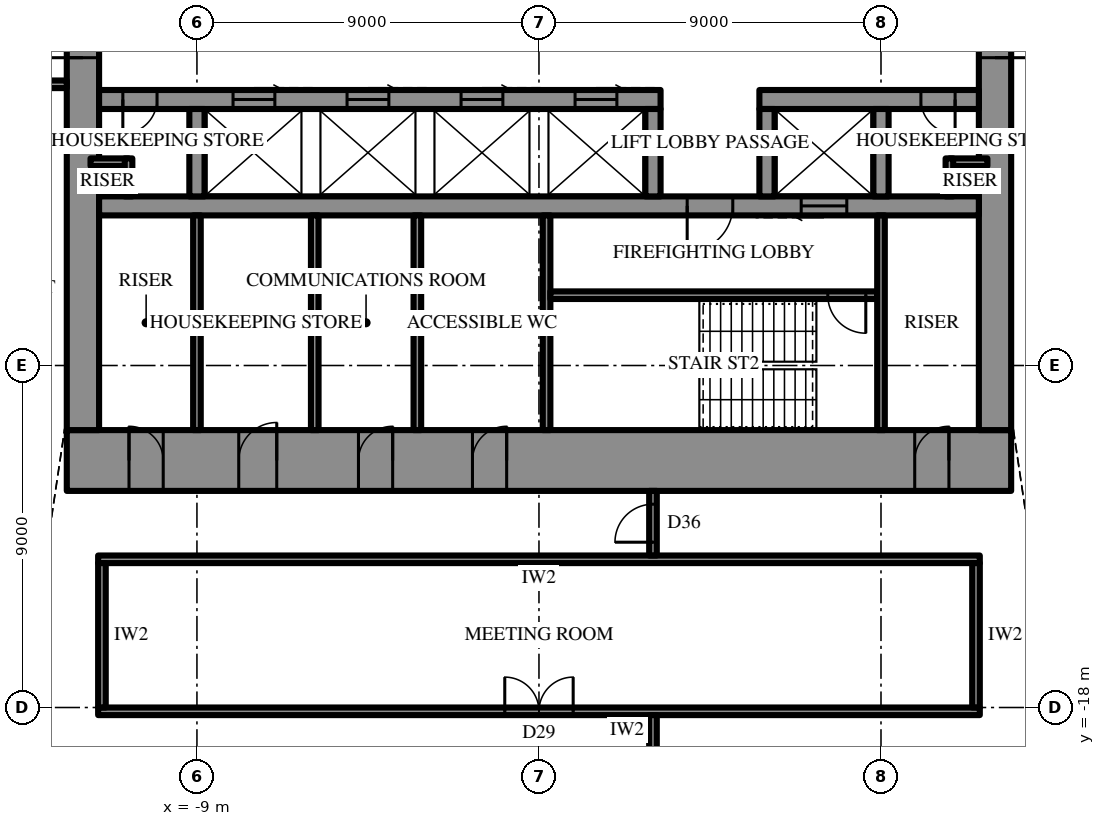
"""IFC4 building model, lengths in metres.
Left out: names, types, materials, properties, quantities, classifications, styles, units other than length and angle.
Written with IfcOpenShell. Run it as: python <this file> out.ifc"""

import sys

from ifc_helpers import new_model, si_unit, direction, frame, frame_2d, origin, place, context, subcontext, project, spatial, rectangle, extrude, element, fill, save


model = new_model("IFC4")
c1 = context("Model", 3, precision=1e-05, world=origin(), true_north=direction((0.0, 1.0)))
c2 = subcontext(c1, "Body", "Model", "MODEL_VIEW")
j1 = project(units=[si_unit("LENGTHUNIT", "METRE"), si_unit("PLANEANGLEUNIT", "RADIAN")], contexts=[c1])
p1 = place(None, origin())
s1 = spatial("IfcSite", under=j1, at=p1, CompositionType="ELEMENT")
p2 = place(p1, origin())
s2 = spatial("IfcBuilding", under=s1, at=p2, CompositionType="ELEMENT")
p3 = place(p2, frame((0.0, 0.0, 361.9)))
s3 = spatial("IfcBuildingStorey", under=s2, at=p3, CompositionType="ELEMENT", Elevation=361.9)
p4 = place(p3, frame((12.425, -11.5, 0.0), z_axis=(0.0, 0.0, 1.0), x_axis=(-1.0, 0.0, 0.0)))
e1 = element("IfcWall", 1, at=p4, inside=s3, PredefinedType="SHEAR", context=c2, shape_type="SweptSolid", body=[
    extrude(rectangle(XDim=24.85, YDim=1.6, at=frame_2d((12.425, 0.0))), origin(), (0.0, 0.0, 1.0), 4.2),
])
p5 = place(p4, frame((13.275, 0.0, 0.0)))
e2 = element("IfcOpeningElement", 2, at=p5, cuts=e1, PredefinedType="OPENING", context=c2, shape_type="SweptSolid", body=[
    extrude(rectangle(XDim=0.9, YDim=2.2, at=frame_2d((0.45, 1.1))), frame((0.0, 0.81, 0.0), z_axis=(0.0, -1.0, 0.0), x_axis=(1.0, 0.0, 0.0)), (0.0, 0.0, 1.0), 1.62),
])
p6 = place(p4, frame((16.275, 0.0, 0.0)))
e3 = element("IfcOpeningElement", 3, at=p6, cuts=e1, PredefinedType="OPENING", context=c2, shape_type="SweptSolid", body=[
    extrude(rectangle(XDim=0.9, YDim=2.2, at=frame_2d((0.45, 1.1))), frame((0.0, 0.81, 0.0), z_axis=(0.0, -1.0, 0.0), x_axis=(1.0, 0.0, 0.0)), (0.0, 0.0, 1.0), 1.62),
])
p7 = place(p4, frame((19.325, 0.0, 0.0)))
e4 = element("IfcOpeningElement", 4, at=p7, cuts=e1, PredefinedType="OPENING", context=c2, shape_type="SweptSolid", body=[
    extrude(rectangle(XDim=1.0, YDim=2.2, at=frame_2d((0.5, 1.1))), frame((0.0, 0.81, 0.0), z_axis=(0.0, -1.0, 0.0), x_axis=(1.0, 0.0, 0.0)), (0.0, 0.0, 1.0), 1.62),
])
p8 = place(p4, frame((1.637, 0.0, 0.0)))
e5 = element("IfcOpeningElement", 5, at=p8, cuts=e1, PredefinedType="OPENING", context=c2, shape_type="SweptSolid", body=[
    extrude(rectangle(XDim=0.9, YDim=2.2, at=frame_2d((0.45, 1.1))), frame((0.0, 0.81, 0.0), z_axis=(0.0, -1.0, 0.0), x_axis=(1.0, 0.0, 0.0)), (0.0, 0.0, 1.0), 1.62),
])
p9 = place(p4, frame((22.312, 0.0, 0.0)))
e6 = element("IfcOpeningElement", 6, at=p9, cuts=e1, PredefinedType="OPENING", context=c2, shape_type="SweptSolid", body=[
    extrude(rectangle(XDim=0.9, YDim=2.2, at=frame_2d((0.45, 1.1))), frame((0.0, 0.81, 0.0), z_axis=(0.0, -1.0, 0.0), x_axis=(1.0, 0.0, 0.0)), (0.0, 0.0, 1.0), 1.62),
])
p10 = place(p3, frame((12.0, -10.7, 0.0), z_axis=(0.0, 0.0, 1.0), x_axis=(0.0, 1.0, 0.0)))
e7 = element("IfcWall", 7, at=p10, inside=s3, PredefinedType="SHEAR", context=c2, shape_type="SweptSolid", body=[
    extrude(rectangle(XDim=21.4, YDim=0.85, at=frame_2d((10.7, 0.0))), origin(), (0.0, 0.0, 1.0), 4.2),
])
p11 = place(p10, frame((9.8, 0.0, 0.0)))
e8 = element("IfcOpeningElement", 8, at=p11, cuts=e7, PredefinedType="OPENING", context=c2, shape_type="SweptSolid", body=[
    extrude(rectangle(XDim=1.8, YDim=2.4, at=frame_2d((0.9, 1.2))), frame((0.0, 0.435, 0.0), z_axis=(0.0, -1.0, 0.0), x_axis=(1.0, 0.0, 0.0)), (0.0, 0.0, 1.0), 0.87),
])
p12 = place(p3, frame((-12.0, 10.7, 0.0), z_axis=(0.0, 0.0, 1.0), x_axis=(0.0, -1.0, 0.0)))
e9 = element("IfcWall", 9, at=p12, inside=s3, PredefinedType="SHEAR", context=c2, shape_type="SweptSolid", body=[
    extrude(rectangle(XDim=21.4, YDim=0.85, at=frame_2d((10.7, 0.0))), origin(), (0.0, 0.0, 1.0), 4.2),
])
p13 = place(p12, frame((9.8, 0.0, 0.0)))
e10 = element("IfcOpeningElement", 10, at=p13, cuts=e9, PredefinedType="OPENING", context=c2, shape_type="SweptSolid", body=[
    extrude(rectangle(XDim=1.8, YDim=2.4, at=frame_2d((0.9, 1.2))), frame((0.0, 0.435, 0.0), z_axis=(0.0, -1.0, 0.0), x_axis=(1.0, 0.0, 0.0)), (0.0, 0.0, 1.0), 0.87),
])
p14 = place(p3, frame((11.575, -2.0, 0.0), z_axis=(0.0, 0.0, 1.0), x_axis=(-1.0, 0.0, 0.0)))
e11 = element("IfcWall", 11, at=p14, inside=s3, PredefinedType="SHEAR", context=c2, shape_type="SweptSolid", body=[
    extrude(rectangle(XDim=5.775, YDim=0.5, at=frame_2d((2.887, 0.0))), origin(), (0.0, 0.0, 1.0), 4.2),
])
p15 = place(p14, frame((0.625, 0.0, 0.0)))
e12 = element("IfcOpeningElement", 12, at=p15, cuts=e11, PredefinedType="OPENING", context=c2, shape_type="SweptSolid", body=[
    extrude(rectangle(XDim=0.9, YDim=2.2, at=frame_2d((0.45, 1.1))), frame((0.0, 0.26, 0.0), z_axis=(0.0, -1.0, 0.0), x_axis=(1.0, 0.0, 0.0)), (0.0, 0.0, 1.0), 0.52),
])
p16 = place(p3, frame((3.2, -2.0, 0.0), z_axis=(0.0, 0.0, 1.0), x_axis=(-1.0, 0.0, 0.0)))
e13 = element("IfcWall", 13, at=p16, inside=s3, PredefinedType="SHEAR", context=c2, shape_type="SweptSolid", body=[
    extrude(rectangle(XDim=14.775, YDim=0.5, at=frame_2d((7.387, 0.0))), origin(), (0.0, 0.0, 1.0), 4.2),
])
p17 = place(p16, frame((13.25, 0.0, 0.0)))
e14 = element("IfcOpeningElement", 14, at=p17, cuts=e13, PredefinedType="OPENING", context=c2, shape_type="SweptSolid", body=[
    extrude(rectangle(XDim=0.9, YDim=2.2, at=frame_2d((0.45, 1.1))), frame((0.0, 0.26, 0.0), z_axis=(0.0, -1.0, 0.0), x_axis=(1.0, 0.0, 0.0)), (0.0, 0.0, 1.0), 0.52),
])
p18 = place(p16, frame((1.15, 0.0, 0.0)))
e15 = element("IfcOpeningElement", 15, at=p18, cuts=e13, PredefinedType="OPENING", context=c2, shape_type="SweptSolid", body=[
    extrude(rectangle(XDim=1.1, YDim=2.2, at=frame_2d((0.55, 1.1))), frame((0.0, 0.26, 0.0), z_axis=(0.0, -1.0, 0.0), x_axis=(1.0, 0.0, 0.0)), (0.0, 0.0, 1.0), 0.52),
])
p19 = place(p16, frame((4.15, 0.0, 0.0)))
e16 = element("IfcOpeningElement", 16, at=p19, cuts=e13, PredefinedType="OPENING", context=c2, shape_type="SweptSolid", body=[
    extrude(rectangle(XDim=1.1, YDim=2.2, at=frame_2d((0.55, 1.1))), frame((0.0, 0.26, 0.0), z_axis=(0.0, -1.0, 0.0), x_axis=(1.0, 0.0, 0.0)), (0.0, 0.0, 1.0), 0.52),
])
p20 = place(p16, frame((7.15, 0.0, 0.0)))
e17 = element("IfcOpeningElement", 17, at=p20, cuts=e13, PredefinedType="OPENING", context=c2, shape_type="SweptSolid", body=[
    extrude(rectangle(XDim=1.1, YDim=2.2, at=frame_2d((0.55, 1.1))), frame((0.0, 0.26, 0.0), z_axis=(0.0, -1.0, 0.0), x_axis=(1.0, 0.0, 0.0)), (0.0, 0.0, 1.0), 0.52),
])
p21 = place(p16, frame((10.15, 0.0, 0.0)))
e18 = element("IfcOpeningElement", 18, at=p21, cuts=e13, PredefinedType="OPENING", context=c2, shape_type="SweptSolid", body=[
    extrude(rectangle(XDim=1.1, YDim=2.2, at=frame_2d((0.55, 1.1))), frame((0.0, 0.26, 0.0), z_axis=(0.0, -1.0, 0.0), x_axis=(1.0, 0.0, 0.0)), (0.0, 0.0, 1.0), 0.52),
])
p22 = place(p3, frame((11.575, -4.8, 0.0), z_axis=(0.0, 0.0, 1.0), x_axis=(-1.0, 0.0, 0.0)))
e19 = element("IfcWall", 19, at=p22, inside=s3, PredefinedType="SHEAR", context=c2, shape_type="SweptSolid", body=[
    extrude(rectangle(XDim=23.15, YDim=0.5, at=frame_2d((11.575, 0.0))), origin(), (0.0, 0.0, 1.0), 4.2),
])
p23 = place(p22, frame((6.475, 0.0, 0.0)))
e20 = element("IfcOpeningElement", 20, at=p23, cuts=e19, PredefinedType="OPENING", context=c2, shape_type="SweptSolid", body=[
    extrude(rectangle(XDim=1.2, YDim=2.2, at=frame_2d((0.6, 1.1))), frame((0.0, 0.26, 0.0), z_axis=(0.0, -1.0, 0.0), x_axis=(1.0, 0.0, 0.0)), (0.0, 0.0, 1.0), 0.52),
])
p24 = place(p22, frame((3.475, 0.0, 0.0)))
e21 = element("IfcOpeningElement", 21, at=p24, cuts=e19, PredefinedType="OPENING", context=c2, shape_type="SweptSolid", body=[
    extrude(rectangle(XDim=1.2, YDim=2.2, at=frame_2d((0.6, 1.1))), frame((0.0, 0.26, 0.0), z_axis=(0.0, -1.0, 0.0), x_axis=(1.0, 0.0, 0.0)), (0.0, 0.0, 1.0), 0.52),
])
for number, where, z_axis, x_axis in (
    (22, (9.0, -2.25, 0.0), (0.0, 0.0, 1.0), (0.0, -1.0, 0.0)),
    (23, (6.0, -2.25, 0.0), (0.0, 0.0, 1.0), (0.0, -1.0, 0.0)),
    (24, (3.0, -2.25, 0.0), (0.0, 0.0, 1.0), (0.0, -1.0, 0.0)),
    (25, (-9.0, -2.25, 0.0), (0.0, 0.0, 1.0), (0.0, -1.0, 0.0)),
):
    element("IfcWall", number, at=place(p3, frame(where, z_axis=z_axis, x_axis=x_axis)), inside=s3, PredefinedType="SHEAR", context=c2, shape_type="SweptSolid", body=[
        extrude(rectangle(XDim=2.3, YDim=0.4, at=frame_2d((1.15, 0.0))), origin(), (0.0, 0.0, 1.0), 4.2),
    ])
p25 = place(p3, frame((0.2, -5.05, 0.0), z_axis=(0.0, 0.0, 1.0), x_axis=(0.0, -1.0, 0.0)))
e26 = element("IfcWall", 26, at=p25, inside=s3, PredefinedType="SHEAR", context=c2, shape_type="SweptSolid", body=[
    extrude(rectangle(XDim=5.65, YDim=0.2, at=frame_2d((2.825, 0.0))), origin(), (0.0, 0.0, 1.0), 4.2),
])
p26 = place(p3, frame((8.9, -7.15, 0.0), z_axis=(0.0, 0.0, 1.0), x_axis=(-1.0, 0.0, 0.0)))
e27 = element("IfcWall", 27, at=p26, inside=s3, PredefinedType="SHEAR", context=c2, shape_type="SweptSolid", body=[
    extrude(rectangle(XDim=8.6, YDim=0.2, at=frame_2d((4.3, 0.0))), origin(), (0.0, 0.0, 1.0), 4.2),
])
p27 = place(p26, frame((0.3, 0.0, 0.0)))
e28 = element("IfcOpeningElement", 28, at=p27, cuts=e27, PredefinedType="OPENING", context=c2, shape_type="SweptSolid", body=[
    extrude(rectangle(XDim=1.0, YDim=2.2, at=frame_2d((0.5, 1.1))), frame((0.0, 0.11, 0.0), z_axis=(0.0, -1.0, 0.0), x_axis=(1.0, 0.0, 0.0)), (0.0, 0.0, 1.0), 0.22),
])
for number, where, z_axis, x_axis in (
    (29, (9.0, -5.05, 0.0), (0.0, 0.0, 1.0), (0.0, -1.0, 0.0)),
    (30, (-9.0, -5.05, 0.0), (0.0, 0.0, 1.0), (0.0, -1.0, 0.0)),
    (31, (-3.2, -5.05, 0.0), (0.0, 0.0, 1.0), (0.0, -1.0, 0.0)),
    (32, (-5.9, -5.05, 0.0), (0.0, 0.0, 1.0), (0.0, -1.0, 0.0)),
):
    element("IfcWall", number, at=place(p3, frame(where, z_axis=z_axis, x_axis=x_axis)), inside=s3, PredefinedType="PARTITIONING", context=c2, shape_type="SweptSolid", body=[
        extrude(rectangle(XDim=5.65, YDim=0.2, at=frame_2d((2.825, 0.0))), origin(), (0.0, 0.0, 1.0), 4.0),
    ])
for number, where, z_axis, x_axis in (
    (33, (11.8, -3.65, 0.0), (0.0, 0.0, 1.0), (-1.0, 0.0, 0.0)),
    (34, (10.8, -3.55, 0.0), (0.0, 0.0, 1.0), (0.0, -1.0, 0.0)),
    (35, (-10.8, -3.65, 0.0), (0.0, 0.0, 1.0), (-1.0, 0.0, 0.0)),
    (36, (-10.8, -3.55, 0.0), (0.0, 0.0, 1.0), (0.0, -1.0, 0.0)),
):
    element("IfcWall", number, at=place(p3, frame(where, z_axis=z_axis, x_axis=x_axis)), inside=s3, PredefinedType="PARTITIONING", context=c2, shape_type="SweptSolid", body=[
        extrude(rectangle(XDim=1.0, YDim=0.2, at=frame_2d((0.5, 0.0))), origin(), (0.0, 0.0, 1.0), 4.0),
    ])
p28 = place(p3, frame((11.6, -14.1, 0.0), z_axis=(0.0, 0.0, 1.0), x_axis=(-1.0, 0.0, 0.0)))
e37 = element("IfcWall", 37, at=p28, inside=s3, PredefinedType="PARTITIONING", context=c2, shape_type="SweptSolid", body=[
    extrude(rectangle(XDim=23.2, YDim=0.2, at=frame_2d((11.6, 0.0))), origin(), (0.0, 0.0, 1.0), 4.0),
])
p29 = place(p3, frame((11.6, -18.1, 0.0), z_axis=(0.0, 0.0, 1.0), x_axis=(-1.0, 0.0, 0.0)))
e38 = element("IfcWall", 38, at=p29, inside=s3, PredefinedType="PARTITIONING", context=c2, shape_type="SweptSolid", body=[
    extrude(rectangle(XDim=23.2, YDim=0.2, at=frame_2d((11.6, 0.0))), origin(), (0.0, 0.0, 1.0), 4.0),
])
p30 = place(p29, frame((10.7, 0.0, 0.0)))
e39 = element("IfcOpeningElement", 39, at=p30, cuts=e38, PredefinedType="OPENING", context=c2, shape_type="SweptSolid", body=[
    extrude(rectangle(XDim=1.8, YDim=2.4, at=frame_2d((0.9, 1.2))), frame((0.0, 0.11, 0.0), z_axis=(0.0, -1.0, 0.0), x_axis=(1.0, 0.0, 0.0)), (0.0, 0.0, 1.0), 0.22),
])
for number, where, z_axis, x_axis in (
    (40, (11.5, -14.2, 0.0), (0.0, 0.0, 1.0), (0.0, -1.0, 0.0)),
    (41, (-11.5, -14.2, 0.0), (0.0, 0.0, 1.0), (0.0, -1.0, 0.0)),
):
    element("IfcWall", number, at=place(p3, frame(where, z_axis=z_axis, x_axis=x_axis)), inside=s3, PredefinedType="PARTITIONING", context=c2, shape_type="SweptSolid", body=[
        extrude(rectangle(XDim=3.8, YDim=0.2, at=frame_2d((1.9, 0.0))), origin(), (0.0, 0.0, 1.0), 4.0),
    ])
p31 = place(p3, frame((3.0, -12.3, 0.0), z_axis=(0.0, 0.0, 1.0), x_axis=(0.0, -1.0, 0.0)))
e42 = element("IfcWall", 42, at=p31, inside=s3, PredefinedType="PARTITIONING", context=c2, shape_type="SweptSolid", body=[
    extrude(rectangle(XDim=1.7, YDim=0.2, at=frame_2d((0.85, 0.0))), origin(), (0.0, 0.0, 1.0), 4.0),
])
p32 = place(p31, frame((0.35, 0.0, 0.0)))
e43 = element("IfcOpeningElement", 43, at=p32, cuts=e42, PredefinedType="OPENING", context=c2, shape_type="SweptSolid", body=[
    extrude(rectangle(XDim=1.0, YDim=2.2, at=frame_2d((0.5, 1.1))), frame((0.0, 0.11, 0.0), z_axis=(0.0, -1.0, 0.0), x_axis=(1.0, 0.0, 0.0)), (0.0, 0.0, 1.0), 0.22),
])
p33 = place(p3, frame((3.0, -18.2, 0.0), z_axis=(0.0, 0.0, 1.0), x_axis=(0.0, -1.0, 0.0)))
e44 = element("IfcWall", 44, at=p33, inside=s3, PredefinedType="PARTITIONING", context=c2, shape_type="SweptSolid", body=[
    extrude(rectangle(XDim=8.35, YDim=0.2, at=frame_2d((4.175, 0.0))), origin(), (0.0, 0.0, 1.0), 4.0),
])
p34 = place(p3, frame((-12.425, -1.6, 0.0), z_axis=(0.0, 0.0, 1.0), x_axis=(-1.0, 0.0, 0.0)))
e45 = element("IfcWall", 45, at=p34, inside=s3, PredefinedType="PARTITIONING", context=c2, shape_type="SweptSolid", body=[
    extrude(rectangle(XDim=16.5, YDim=0.2, at=frame_2d((8.25, 0.0))), origin(), (0.0, 0.0, 1.0), 4.0),
])
p35 = place(p34, frame((1.15, 0.0, 0.0)))
e46 = element("IfcOpeningElement", 46, at=p35, cuts=e45, PredefinedType="OPENING", context=c2, shape_type="SweptSolid", body=[
    extrude(rectangle(XDim=1.0, YDim=2.2, at=frame_2d((0.5, 1.1))), frame((0.0, 0.11, 0.0), z_axis=(0.0, -1.0, 0.0), x_axis=(1.0, 0.0, 0.0)), (0.0, 0.0, 1.0), 0.22),
])
p36 = place(p11, frame((1.8, 0.0, 0.0), z_axis=(0.0, 0.0, 1.0), x_axis=(-1.0, 0.0, 0.0)))
e47 = element("IfcDoor", 47, at=p36, inside=s3, OperationType="DOUBLE_DOOR_SINGLE_SWING", PredefinedType="DOOR", context=c2, shape_type="SweptSolid", body=[
    extrude(rectangle(XDim=1.8, YDim=2.4, at=frame_2d((0.9, 1.2))), frame((0.0, 0.025, 0.0), z_axis=(0.0, -1.0, 0.0), x_axis=(1.0, 0.0, 0.0)), (0.0, 0.0, 1.0), 0.05),
])
fill(e8, e47)
p37 = place(p13, frame((1.8, 0.0, 0.0), z_axis=(0.0, 0.0, 1.0), x_axis=(-1.0, 0.0, 0.0)))
e48 = element("IfcDoor", 48, at=p37, inside=s3, OperationType="DOUBLE_DOOR_SINGLE_SWING", PredefinedType="DOOR", context=c2, shape_type="SweptSolid", body=[
    extrude(rectangle(XDim=1.8, YDim=2.4, at=frame_2d((0.9, 1.2))), frame((0.0, 0.025, 0.0), z_axis=(0.0, -1.0, 0.0), x_axis=(1.0, 0.0, 0.0)), (0.0, 0.0, 1.0), 0.05),
])
fill(e10, e48)
p38 = place(p23, origin())
e49 = element("IfcDoor", 49, at=p38, inside=s3, OperationType="SINGLE_SWING_LEFT", PredefinedType="DOOR", context=c2, shape_type="SweptSolid", body=[
    extrude(rectangle(XDim=1.2, YDim=2.2, at=frame_2d((0.6, 1.1))), frame((0.0, 0.025, 0.0), z_axis=(0.0, -1.0, 0.0), x_axis=(1.0, 0.0, 0.0)), (0.0, 0.0, 1.0), 0.05),
])
fill(e20, e49)
p39 = place(p27, origin())
e50 = element("IfcDoor", 50, at=p39, inside=s3, OperationType="SINGLE_SWING_RIGHT", PredefinedType="DOOR", context=c2, shape_type="SweptSolid", body=[
    extrude(rectangle(XDim=1.0, YDim=2.2, at=frame_2d((0.5, 1.1))), frame((0.0, 0.025, 0.0), z_axis=(0.0, -1.0, 0.0), x_axis=(1.0, 0.0, 0.0)), (0.0, 0.0, 1.0), 0.05),
])
fill(e28, e50)
p40 = place(p5, frame((0.9, 0.0, 0.0), z_axis=(0.0, 0.0, 1.0), x_axis=(-1.0, 0.0, 0.0)))
e51 = element("IfcDoor", 51, at=p40, inside=s3, OperationType="SINGLE_SWING_LEFT", PredefinedType="DOOR", context=c2, shape_type="SweptSolid", body=[
    extrude(rectangle(XDim=0.9, YDim=2.2, at=frame_2d((0.45, 1.1))), frame((0.0, 0.025, 0.0), z_axis=(0.0, -1.0, 0.0), x_axis=(1.0, 0.0, 0.0)), (0.0, 0.0, 1.0), 0.05),
])
fill(e2, e51)
p41 = place(p6, frame((0.9, 0.0, 0.0), z_axis=(0.0, 0.0, 1.0), x_axis=(-1.0, 0.0, 0.0)))
e52 = element("IfcDoor", 52, at=p41, inside=s3, OperationType="SINGLE_SWING_LEFT", PredefinedType="DOOR", context=c2, shape_type="SweptSolid", body=[
    extrude(rectangle(XDim=0.9, YDim=2.2, at=frame_2d((0.45, 1.1))), frame((0.0, 0.025, 0.0), z_axis=(0.0, -1.0, 0.0), x_axis=(1.0, 0.0, 0.0)), (0.0, 0.0, 1.0), 0.05),
])
fill(e3, e52)
p42 = place(p7, frame((1.0, 0.0, 0.0), z_axis=(0.0, 0.0, 1.0), x_axis=(-1.0, 0.0, 0.0)))
e53 = element("IfcDoor", 53, at=p42, inside=s3, OperationType="SINGLE_SWING_LEFT", PredefinedType="DOOR", context=c2, shape_type="SweptSolid", body=[
    extrude(rectangle(XDim=1.0, YDim=2.2, at=frame_2d((0.5, 1.1))), frame((0.0, 0.025, 0.0), z_axis=(0.0, -1.0, 0.0), x_axis=(1.0, 0.0, 0.0)), (0.0, 0.0, 1.0), 0.05),
])
fill(e4, e53)
p43 = place(p8, frame((0.9, 0.0, 0.0), z_axis=(0.0, 0.0, 1.0), x_axis=(-1.0, 0.0, 0.0)))
e54 = element("IfcDoor", 54, at=p43, inside=s3, OperationType="SINGLE_SWING_LEFT", PredefinedType="DOOR", context=c2, shape_type="SweptSolid", body=[
    extrude(rectangle(XDim=0.9, YDim=2.2, at=frame_2d((0.45, 1.1))), frame((0.0, 0.025, 0.0), z_axis=(0.0, -1.0, 0.0), x_axis=(1.0, 0.0, 0.0)), (0.0, 0.0, 1.0), 0.05),
])
fill(e5, e54)
p44 = place(p9, frame((0.9, 0.0, 0.0), z_axis=(0.0, 0.0, 1.0), x_axis=(-1.0, 0.0, 0.0)))
e55 = element("IfcDoor", 55, at=p44, inside=s3, OperationType="SINGLE_SWING_RIGHT", PredefinedType="DOOR", context=c2, shape_type="SweptSolid", body=[
    extrude(rectangle(XDim=0.9, YDim=2.2, at=frame_2d((0.45, 1.1))), frame((0.0, 0.025, 0.0), z_axis=(0.0, -1.0, 0.0), x_axis=(1.0, 0.0, 0.0)), (0.0, 0.0, 1.0), 0.05),
])
fill(e6, e55)
p45 = place(p15, origin())
e56 = element("IfcDoor", 56, at=p45, inside=s3, OperationType="SINGLE_SWING_RIGHT", PredefinedType="DOOR", context=c2, shape_type="SweptSolid", body=[
    extrude(rectangle(XDim=0.9, YDim=2.2, at=frame_2d((0.45, 1.1))), frame((0.0, 0.025, 0.0), z_axis=(0.0, -1.0, 0.0), x_axis=(1.0, 0.0, 0.0)), (0.0, 0.0, 1.0), 0.05),
])
fill(e12, e56)
p46 = place(p17, origin())
e57 = element("IfcDoor", 57, at=p46, inside=s3, OperationType="SINGLE_SWING_LEFT", PredefinedType="DOOR", context=c2, shape_type="SweptSolid", body=[
    extrude(rectangle(XDim=0.9, YDim=2.2, at=frame_2d((0.45, 1.1))), frame((0.0, 0.025, 0.0), z_axis=(0.0, -1.0, 0.0), x_axis=(1.0, 0.0, 0.0)), (0.0, 0.0, 1.0), 0.05),
])
fill(e14, e57)
p47 = place(p24, origin())
e58 = element("IfcDoor", 58, at=p47, inside=s3, OperationType="SLIDING_TO_LEFT", PredefinedType="DOOR", context=c2, shape_type="SweptSolid", body=[
    extrude(rectangle(XDim=1.2, YDim=2.2, at=frame_2d((0.6, 1.1))), frame((0.0, 0.025, 0.0), z_axis=(0.0, -1.0, 0.0), x_axis=(1.0, 0.0, 0.0)), (0.0, 0.0, 1.0), 0.05),
])
fill(e21, e58)
p48 = place(p18, frame((1.1, 0.0, 0.0), z_axis=(0.0, 0.0, 1.0), x_axis=(-1.0, 0.0, 0.0)))
e59 = element("IfcDoor", 59, at=p48, inside=s3, OperationType="SLIDING_TO_LEFT", PredefinedType="DOOR", context=c2, shape_type="SweptSolid", body=[
    extrude(rectangle(XDim=1.1, YDim=2.2, at=frame_2d((0.55, 1.1))), frame((0.0, 0.025, 0.0), z_axis=(0.0, -1.0, 0.0), x_axis=(1.0, 0.0, 0.0)), (0.0, 0.0, 1.0), 0.05),
])
fill(e15, e59)
p49 = place(p19, frame((1.1, 0.0, 0.0), z_axis=(0.0, 0.0, 1.0), x_axis=(-1.0, 0.0, 0.0)))
e60 = element("IfcDoor", 60, at=p49, inside=s3, OperationType="SLIDING_TO_LEFT", PredefinedType="DOOR", context=c2, shape_type="SweptSolid", body=[
    extrude(rectangle(XDim=1.1, YDim=2.2, at=frame_2d((0.55, 1.1))), frame((0.0, 0.025, 0.0), z_axis=(0.0, -1.0, 0.0), x_axis=(1.0, 0.0, 0.0)), (0.0, 0.0, 1.0), 0.05),
])
fill(e16, e60)
p50 = place(p20, frame((1.1, 0.0, 0.0), z_axis=(0.0, 0.0, 1.0), x_axis=(-1.0, 0.0, 0.0)))
e61 = element("IfcDoor", 61, at=p50, inside=s3, OperationType="SLIDING_TO_LEFT", PredefinedType="DOOR", context=c2, shape_type="SweptSolid", body=[
    extrude(rectangle(XDim=1.1, YDim=2.2, at=frame_2d((0.55, 1.1))), frame((0.0, 0.025, 0.0), z_axis=(0.0, -1.0, 0.0), x_axis=(1.0, 0.0, 0.0)), (0.0, 0.0, 1.0), 0.05),
])
fill(e17, e61)
p51 = place(p21, frame((1.1, 0.0, 0.0), z_axis=(0.0, 0.0, 1.0), x_axis=(-1.0, 0.0, 0.0)))
e62 = element("IfcDoor", 62, at=p51, inside=s3, OperationType="SLIDING_TO_LEFT", PredefinedType="DOOR", context=c2, shape_type="SweptSolid", body=[
    extrude(rectangle(XDim=1.1, YDim=2.2, at=frame_2d((0.55, 1.1))), frame((0.0, 0.025, 0.0), z_axis=(0.0, -1.0, 0.0), x_axis=(1.0, 0.0, 0.0)), (0.0, 0.0, 1.0), 0.05),
])
fill(e18, e62)
p52 = place(p30, frame((1.8, 0.0, 0.0), z_axis=(0.0, 0.0, 1.0), x_axis=(-1.0, 0.0, 0.0)))
e63 = element("IfcDoor", 63, at=p52, inside=s3, OperationType="DOUBLE_DOOR_SINGLE_SWING", PredefinedType="DOOR", context=c2, shape_type="SweptSolid", body=[
    extrude(rectangle(XDim=1.8, YDim=2.4, at=frame_2d((0.9, 1.2))), frame((0.0, 0.025, 0.0), z_axis=(0.0, -1.0, 0.0), x_axis=(1.0, 0.0, 0.0)), (0.0, 0.0, 1.0), 0.05),
])
fill(e39, e63)
p53 = place(p32, frame((1.0, 0.0, 0.0), z_axis=(0.0, 0.0, 1.0), x_axis=(-1.0, 0.0, 0.0)))
e64 = element("IfcDoor", 64, at=p53, inside=s3, OperationType="SINGLE_SWING_RIGHT", PredefinedType="DOOR", context=c2, shape_type="SweptSolid", body=[
    extrude(rectangle(XDim=1.0, YDim=2.2, at=frame_2d((0.5, 1.1))), frame((0.0, 0.025, 0.0), z_axis=(0.0, -1.0, 0.0), x_axis=(1.0, 0.0, 0.0)), (0.0, 0.0, 1.0), 0.05),
])
fill(e43, e64)
save(model, sys.argv[1])
